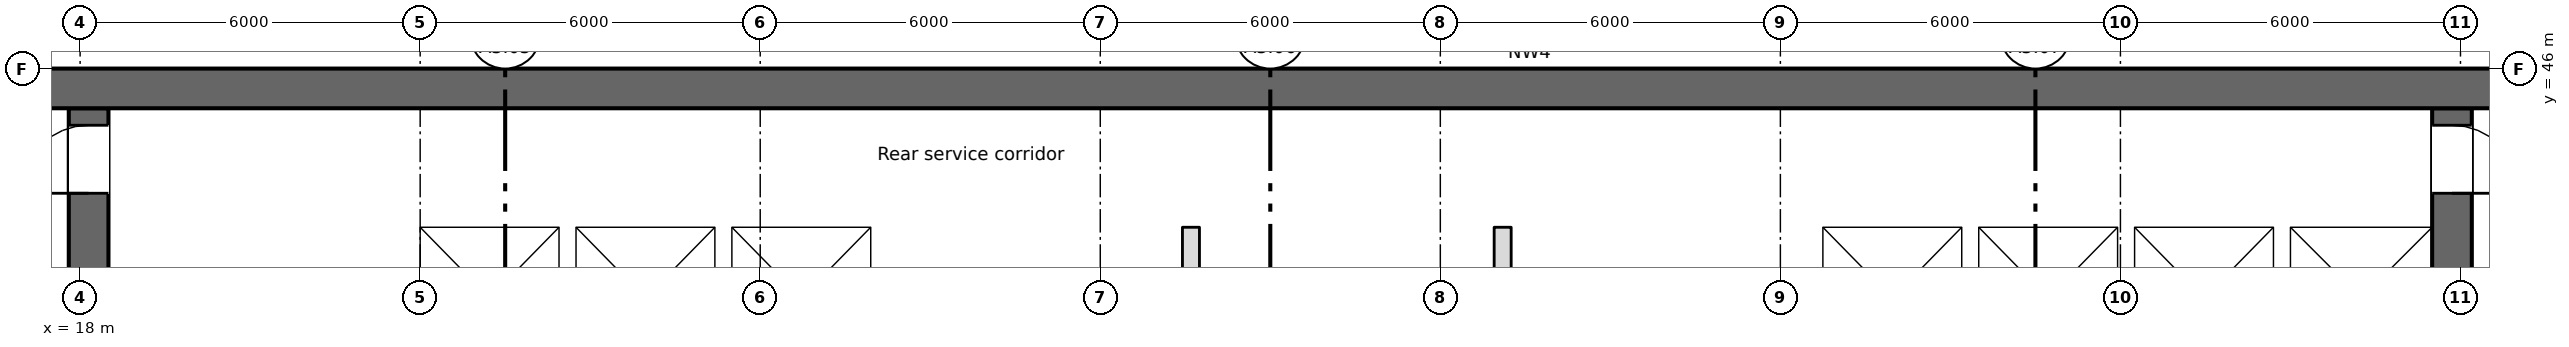
"""IFC4 building model, lengths in metres.
Left out: names, types, materials, properties, quantities, classifications, styles, units other than length and angle.
Written with IfcOpenShell. Run it as: python <this file> out.ifc"""

import sys

from ifc_helpers import new_model, si_unit, direction, frame, frame_2d, origin, place, context, subcontext, project, spatial, rectangle, extrude, element, fill, save


model = new_model("IFC4")
c1 = context("Model", 3, precision=1e-05, world=origin(), true_north=direction((0.0, 1.0)))
c2 = subcontext(c1, "Body", "Model", "MODEL_VIEW")
j1 = project(units=[si_unit("LENGTHUNIT", "METRE"), si_unit("PLANEANGLEUNIT", "RADIAN")], contexts=[c1])
p1 = place(None, origin())
s1 = spatial("IfcSite", under=j1, at=p1, CompositionType="ELEMENT")
p2 = place(p1, origin())
s2 = spatial("IfcBuilding", under=s1, at=p2, CompositionType="ELEMENT")
p3 = place(p2, frame((0.0, 0.0, 185.5)))
s3 = spatial("IfcBuildingStorey", under=s2, at=p3, CompositionType="ELEMENT", Elevation=185.5)
p4 = place(p3, frame((11.55, 45.65, 0.0), z_axis=(0.0, 0.0, 1.0), x_axis=(1.0, 0.0, 0.0)))
e1 = element("IfcWall", 1, at=p4, inside=s3, PredefinedType="SHEAR", context=c2, shape_type="SweptSolid", body=[
    extrude(rectangle(XDim=54.9, YDim=0.7, at=frame_2d((27.45, 0.0))), origin(), (0.0, 0.0, 1.0), 3.35),
])
p5 = place(p4, frame((1.2, 0.0, 0.6)))
e2 = element("IfcOpeningElement", 2, at=p5, cuts=e1, PredefinedType="OPENING", context=c2, shape_type="SweptSolid", body=[
    extrude(rectangle(XDim=0.6, YDim=2.4, at=frame_2d((0.3, 1.2))), frame((0.0, 0.36, 0.0), z_axis=(0.0, -1.0, 0.0), x_axis=(1.0, 0.0, 0.0)), (0.0, 0.0, 1.0), 0.72),
])
p6 = place(p4, frame((49.2, 0.0, 0.6)))
e3 = element("IfcOpeningElement", 3, at=p6, cuts=e1, PredefinedType="OPENING", context=c2, shape_type="SweptSolid", body=[
    extrude(rectangle(XDim=0.6, YDim=2.4, at=frame_2d((0.3, 1.2))), frame((0.0, 0.36, 0.0), z_axis=(0.0, -1.0, 0.0), x_axis=(1.0, 0.0, 0.0)), (0.0, 0.0, 1.0), 0.72),
])
p7 = place(p3, frame((18.15, 28.4, 0.0), z_axis=(0.0, 0.0, 1.0), x_axis=(0.0, 1.0, 0.0)))
e4 = element("IfcWall", 4, at=p7, inside=s3, PredefinedType="SHEAR", context=c2, shape_type="SweptSolid", body=[
    extrude(rectangle(XDim=16.9, YDim=0.7, at=frame_2d((8.45, 0.0))), origin(), (0.0, 0.0, 1.0), 3.35),
])
p8 = place(p7, frame((9.6, 0.0, 0.0)))
e5 = element("IfcOpeningElement", 5, at=p8, cuts=e4, PredefinedType="OPENING", context=c2, shape_type="SweptSolid", body=[
    extrude(rectangle(XDim=2.0, YDim=2.1, at=frame_2d((1.0, 1.05))), frame((0.0, 0.36, 0.0), z_axis=(0.0, -1.0, 0.0), x_axis=(1.0, 0.0, 0.0)), (0.0, 0.0, 1.0), 0.72),
])
p9 = place(p7, frame((15.4, 0.0, 0.0)))
e6 = element("IfcOpeningElement", 6, at=p9, cuts=e4, PredefinedType="OPENING", context=c2, shape_type="SweptSolid", body=[
    extrude(rectangle(XDim=1.2, YDim=2.1, at=frame_2d((0.6, 1.05))), frame((0.0, 0.36, 0.0), z_axis=(0.0, -1.0, 0.0), x_axis=(1.0, 0.0, 0.0)), (0.0, 0.0, 1.0), 0.72),
])
p10 = place(p3, frame((59.85, 28.4, 0.0), z_axis=(0.0, 0.0, 1.0), x_axis=(0.0, 1.0, 0.0)))
e7 = element("IfcWall", 7, at=p10, inside=s3, PredefinedType="SHEAR", context=c2, shape_type="SweptSolid", body=[
    extrude(rectangle(XDim=16.9, YDim=0.7, at=frame_2d((8.45, 0.0))), origin(), (0.0, 0.0, 1.0), 3.35),
])
p11 = place(p10, frame((9.6, 0.0, 0.0)))
e8 = element("IfcOpeningElement", 8, at=p11, cuts=e7, PredefinedType="OPENING", context=c2, shape_type="SweptSolid", body=[
    extrude(rectangle(XDim=2.0, YDim=2.1, at=frame_2d((1.0, 1.05))), frame((0.0, 0.36, 0.0), z_axis=(0.0, -1.0, 0.0), x_axis=(1.0, 0.0, 0.0)), (0.0, 0.0, 1.0), 0.72),
])
p12 = place(p10, frame((15.4, 0.0, 0.0)))
e9 = element("IfcOpeningElement", 9, at=p12, cuts=e7, PredefinedType="OPENING", context=c2, shape_type="SweptSolid", body=[
    extrude(rectangle(XDim=1.2, YDim=2.1, at=frame_2d((0.6, 1.05))), frame((0.0, 0.36, 0.0), z_axis=(0.0, -1.0, 0.0), x_axis=(1.0, 0.0, 0.0)), (0.0, 0.0, 1.0), 0.72),
])
p13 = place(p3, frame((18.5, 43.35, 0.0), z_axis=(0.0, 0.0, 1.0), x_axis=(1.0, 0.0, 0.0)))
e10 = element("IfcWall", 10, at=p13, inside=s3, PredefinedType="SHEAR", context=c2, shape_type="SweptSolid", body=[
    extrude(rectangle(XDim=41.0, YDim=0.3, at=frame_2d((20.5, 0.0))), origin(), (0.0, 0.0, 1.0), 3.35),
])
for number, where, z_axis, x_axis in (
    (11, (23.85, 40.7, 0.0), (0.0, 0.0, 1.0), (0.0, 1.0, 0.0)),
    (12, (26.6, 40.7, 0.0), (0.0, 0.0, 1.0), (0.0, 1.0, 0.0)),
    (13, (29.35, 40.7, 0.0), (0.0, 0.0, 1.0), (0.0, 1.0, 0.0)),
    (14, (32.1, 40.7, 0.0), (0.0, 0.0, 1.0), (0.0, 1.0, 0.0)),
    (15, (48.6, 40.7, 0.0), (0.0, 0.0, 1.0), (0.0, 1.0, 0.0)),
    (16, (51.35, 40.7, 0.0), (0.0, 0.0, 1.0), (0.0, 1.0, 0.0)),
    (17, (54.1, 40.7, 0.0), (0.0, 0.0, 1.0), (0.0, 1.0, 0.0)),
    (18, (56.85, 40.7, 0.0), (0.0, 0.0, 1.0), (0.0, 1.0, 0.0)),
):
    element("IfcWall", number, at=place(p3, frame(where, z_axis=z_axis, x_axis=x_axis)), inside=s3, PredefinedType="SHEAR", context=c2, shape_type="SweptSolid", body=[
        extrude(rectangle(XDim=2.5, YDim=0.3, at=frame_2d((1.25, 0.0))), origin(), (0.0, 0.0, 1.0), 3.35),
    ])
for number, where, z_axis, x_axis in (
    (19, (37.6, 40.7, 0.0), (0.0, 0.0, 1.0), (0.0, 1.0, 0.0)),
    (20, (43.1, 40.7, 0.0), (0.0, 0.0, 1.0), (0.0, 1.0, 0.0)),
):
    element("IfcWall", number, at=place(p3, frame(where, z_axis=z_axis, x_axis=x_axis)), inside=s3, PredefinedType="PARTITIONING", context=c2, shape_type="SweptSolid", body=[
        extrude(rectangle(XDim=2.5, YDim=0.3, at=frame_2d((1.25, 0.0))), origin(), (0.0, 0.0, 1.0), 3.35),
    ])
p14 = place(p9, origin())
e21 = element("IfcDoor", 21, at=p14, inside=s3, OperationType="SINGLE_SWING_LEFT", PredefinedType="DOOR", context=c2, shape_type="SweptSolid", body=[
    extrude(rectangle(XDim=1.2, YDim=2.1, at=frame_2d((0.6, 1.05))), frame((0.0, 0.025, 0.0), z_axis=(0.0, -1.0, 0.0), x_axis=(1.0, 0.0, 0.0)), (0.0, 0.0, 1.0), 0.05),
])
fill(e6, e21)
p15 = place(p12, origin())
e22 = element("IfcDoor", 22, at=p15, inside=s3, OperationType="SINGLE_SWING_LEFT", PredefinedType="DOOR", context=c2, shape_type="SweptSolid", body=[
    extrude(rectangle(XDim=1.2, YDim=2.1, at=frame_2d((0.6, 1.05))), frame((0.0, 0.025, 0.0), z_axis=(0.0, -1.0, 0.0), x_axis=(1.0, 0.0, 0.0)), (0.0, 0.0, 1.0), 0.05),
])
fill(e9, e22)
save(model, sys.argv[1])
